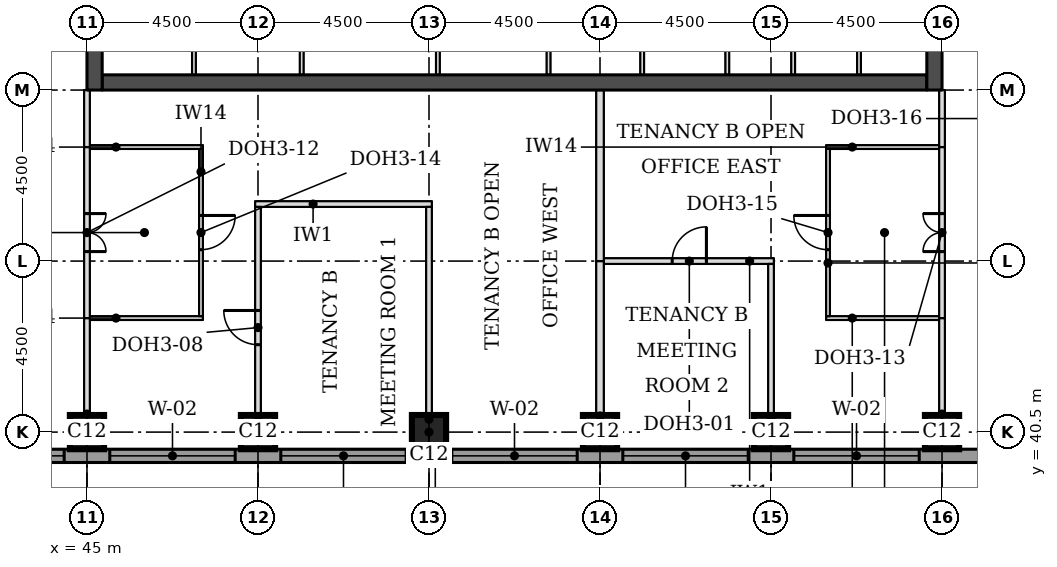
"""IFC4 building model, lengths in metres.
Left out: names, types, materials, properties, quantities, classifications, styles, units other than length and angle.
Written with IfcOpenShell. Run it as: python <this file> out.ifc"""

import sys

from ifc_helpers import new_model, si_unit, direction, frame, frame_2d, origin, origin_2d, place, context, subcontext, project, spatial, rectangle, extrude, element, fill, save


model = new_model("IFC4")
c1 = context("Model", 3, precision=1e-05, world=origin(), true_north=direction((0.0, 1.0)))
c2 = subcontext(c1, "Body", "Model", "MODEL_VIEW")
j1 = project(units=[si_unit("LENGTHUNIT", "METRE"), si_unit("PLANEANGLEUNIT", "RADIAN")], contexts=[c1])
p1 = place(None, origin())
s1 = spatial("IfcSite", under=j1, at=p1, CompositionType="ELEMENT")
p2 = place(p1, origin())
s2 = spatial("IfcBuilding", under=s1, at=p2, CompositionType="ELEMENT")
p3 = place(p2, frame((0.0, 0.0, 162.5)))
s3 = spatial("IfcBuildingStorey", under=s2, at=p3, CompositionType="ELEMENT", Elevation=162.5)
for number, where, z_axis, x_axis in (
    (1, (45.0, 40.5, 0.0), (0.0, 0.0, 1.0), (1.0, 0.0, 0.0)),
    (2, (49.5, 40.5, 0.0), (0.0, 0.0, 1.0), (1.0, 0.0, 0.0)),
    (3, (54.0, 40.5, 0.0), (0.0, 0.0, 1.0), (1.0, 0.0, 0.0)),
    (4, (58.5, 40.5, 0.0), (0.0, 0.0, 1.0), (1.0, 0.0, 0.0)),
    (5, (63.0, 40.5, 0.0), (0.0, 0.0, 1.0), (1.0, 0.0, 0.0)),
    (6, (67.5, 40.5, 0.0), (0.0, 0.0, 1.0), (1.0, 0.0, 0.0)),
):
    element("IfcColumn", number, at=place(p3, frame(where, z_axis=z_axis, x_axis=x_axis)), inside=s3, PredefinedType="COLUMN", context=c2, shape_type="SweptSolid", body=[
        extrude(rectangle(XDim=0.9, YDim=0.9, at=origin_2d()), origin(), (0.0, 0.0, 1.0), 3.7),
    ])
p4 = place(p3, frame((45.4, 49.7, 0.0), z_axis=(0.0, 0.0, 1.0), x_axis=(1.0, 0.0, 0.0)))
e7 = element("IfcWall", 7, at=p4, inside=s3, PredefinedType="SHEAR", context=c2, shape_type="SweptSolid", body=[
    extrude(rectangle(XDim=21.7, YDim=0.4, at=frame_2d((10.85, 0.0))), origin(), (0.0, 0.0, 1.0), 3.7),
])
p5 = place(p3, frame((45.2, 49.5, 0.0), z_axis=(0.0, 0.0, 1.0), x_axis=(0.0, 1.0, 0.0)))
e8 = element("IfcWall", 8, at=p5, inside=s3, PredefinedType="SHEAR", context=c2, shape_type="SweptSolid", body=[
    extrude(rectangle(XDim=22.5, YDim=0.4, at=frame_2d((11.25, 0.0))), origin(), (0.0, 0.0, 1.0), 3.7),
])
p6 = place(p5, frame((4.2, 0.0, 0.0)))
e9 = element("IfcOpeningElement", 9, at=p6, cuts=e8, PredefinedType="OPENING", context=c2, shape_type="SweptSolid", body=[
    extrude(rectangle(XDim=1.8, YDim=2.1, at=frame_2d((0.9, 1.05))), frame((0.0, 0.21, 0.0), z_axis=(0.0, -1.0, 0.0), x_axis=(1.0, 0.0, 0.0)), (0.0, 0.0, 1.0), 0.42),
])
p7 = place(p5, frame((6.9, 0.0, 0.0)))
e10 = element("IfcOpeningElement", 10, at=p7, cuts=e8, PredefinedType="OPENING", context=c2, shape_type="SweptSolid", body=[
    extrude(rectangle(XDim=1.1, YDim=2.1, at=frame_2d((0.55, 1.05))), frame((0.0, 0.21, 0.0), z_axis=(0.0, -1.0, 0.0), x_axis=(1.0, 0.0, 0.0)), (0.0, 0.0, 1.0), 0.42),
])
p8 = place(p5, frame((13.6, 0.0, 0.0)))
e11 = element("IfcOpeningElement", 11, at=p8, cuts=e8, PredefinedType="OPENING", context=c2, shape_type="SweptSolid", body=[
    extrude(rectangle(XDim=1.1, YDim=2.1, at=frame_2d((0.55, 1.05))), frame((0.0, 0.21, 0.0), z_axis=(0.0, -1.0, 0.0), x_axis=(1.0, 0.0, 0.0)), (0.0, 0.0, 1.0), 0.42),
])
p9 = place(p5, frame((16.5, 0.0, 0.0)))
e12 = element("IfcOpeningElement", 12, at=p9, cuts=e8, PredefinedType="OPENING", context=c2, shape_type="SweptSolid", body=[
    extrude(rectangle(XDim=1.8, YDim=2.1, at=frame_2d((0.9, 1.05))), frame((0.0, 0.21, 0.0), z_axis=(0.0, -1.0, 0.0), x_axis=(1.0, 0.0, 0.0)), (0.0, 0.0, 1.0), 0.42),
])
p10 = place(p3, frame((67.3, 49.5, 0.0), z_axis=(0.0, 0.0, 1.0), x_axis=(0.0, 1.0, 0.0)))
e13 = element("IfcWall", 13, at=p10, inside=s3, PredefinedType="SHEAR", context=c2, shape_type="SweptSolid", body=[
    extrude(rectangle(XDim=22.5, YDim=0.4, at=frame_2d((11.25, 0.0))), origin(), (0.0, 0.0, 1.0), 3.7),
])
p11 = place(p10, frame((4.2, 0.0, 0.0)))
e14 = element("IfcOpeningElement", 14, at=p11, cuts=e13, PredefinedType="OPENING", context=c2, shape_type="SweptSolid", body=[
    extrude(rectangle(XDim=1.8, YDim=2.1, at=frame_2d((0.9, 1.05))), frame((0.0, 0.21, 0.0), z_axis=(0.0, -1.0, 0.0), x_axis=(1.0, 0.0, 0.0)), (0.0, 0.0, 1.0), 0.42),
])
p12 = place(p10, frame((6.9, 0.0, 0.0)))
e15 = element("IfcOpeningElement", 15, at=p12, cuts=e13, PredefinedType="OPENING", context=c2, shape_type="SweptSolid", body=[
    extrude(rectangle(XDim=1.1, YDim=2.1, at=frame_2d((0.55, 1.05))), frame((0.0, 0.21, 0.0), z_axis=(0.0, -1.0, 0.0), x_axis=(1.0, 0.0, 0.0)), (0.0, 0.0, 1.0), 0.42),
])
p13 = place(p10, frame((13.6, 0.0, 0.0)))
e16 = element("IfcOpeningElement", 16, at=p13, cuts=e13, PredefinedType="OPENING", context=c2, shape_type="SweptSolid", body=[
    extrude(rectangle(XDim=1.1, YDim=2.1, at=frame_2d((0.55, 1.05))), frame((0.0, 0.21, 0.0), z_axis=(0.0, -1.0, 0.0), x_axis=(1.0, 0.0, 0.0)), (0.0, 0.0, 1.0), 0.42),
])
p14 = place(p10, frame((16.5, 0.0, 0.0)))
e17 = element("IfcOpeningElement", 17, at=p14, cuts=e13, PredefinedType="OPENING", context=c2, shape_type="SweptSolid", body=[
    extrude(rectangle(XDim=1.8, YDim=2.1, at=frame_2d((0.9, 1.05))), frame((0.0, 0.21, 0.0), z_axis=(0.0, -1.0, 0.0), x_axis=(1.0, 0.0, 0.0)), (0.0, 0.0, 1.0), 0.42),
])
p15 = place(p3, frame((36.0, 39.875, 0.0), z_axis=(0.0, 0.0, 1.0), x_axis=(1.0, 0.0, 0.0)))
e18 = element("IfcWall", 18, at=p15, inside=s3, PredefinedType="STANDARD", context=c2, shape_type="SweptSolid", body=[
    extrude(rectangle(XDim=36.331, YDim=0.35, at=frame_2d((18.166, 0.0))), origin(), (0.0, 0.0, 1.0), 3.525),
])
p16 = place(p15, frame((5.1, 0.0, 0.9)))
e19 = element("IfcOpeningElement", 19, at=p16, cuts=e18, PredefinedType="OPENING", context=c2, shape_type="SweptSolid", body=[
    extrude(rectangle(XDim=3.3, YDim=1.9, at=frame_2d((1.65, 0.95))), frame((0.0, 0.185, 0.0), z_axis=(0.0, -1.0, 0.0), x_axis=(1.0, 0.0, 0.0)), (0.0, 0.0, 1.0), 0.37),
])
p17 = place(p15, frame((9.6, 0.0, 0.9)))
e20 = element("IfcOpeningElement", 20, at=p17, cuts=e18, PredefinedType="OPENING", context=c2, shape_type="SweptSolid", body=[
    extrude(rectangle(XDim=3.3, YDim=1.9, at=frame_2d((1.65, 0.95))), frame((0.0, 0.185, 0.0), z_axis=(0.0, -1.0, 0.0), x_axis=(1.0, 0.0, 0.0)), (0.0, 0.0, 1.0), 0.37),
])
p18 = place(p15, frame((14.1, 0.0, 0.9)))
e21 = element("IfcOpeningElement", 21, at=p18, cuts=e18, PredefinedType="OPENING", context=c2, shape_type="SweptSolid", body=[
    extrude(rectangle(XDim=3.3, YDim=1.9, at=frame_2d((1.65, 0.95))), frame((0.0, 0.185, 0.0), z_axis=(0.0, -1.0, 0.0), x_axis=(1.0, 0.0, 0.0)), (0.0, 0.0, 1.0), 0.37),
])
p19 = place(p15, frame((18.6, 0.0, 0.9)))
e22 = element("IfcOpeningElement", 22, at=p19, cuts=e18, PredefinedType="OPENING", context=c2, shape_type="SweptSolid", body=[
    extrude(rectangle(XDim=3.3, YDim=1.9, at=frame_2d((1.65, 0.95))), frame((0.0, 0.185, 0.0), z_axis=(0.0, -1.0, 0.0), x_axis=(1.0, 0.0, 0.0)), (0.0, 0.0, 1.0), 0.37),
])
p20 = place(p15, frame((23.1, 0.0, 0.9)))
e23 = element("IfcOpeningElement", 23, at=p20, cuts=e18, PredefinedType="OPENING", context=c2, shape_type="SweptSolid", body=[
    extrude(rectangle(XDim=3.3, YDim=1.9, at=frame_2d((1.65, 0.95))), frame((0.0, 0.185, 0.0), z_axis=(0.0, -1.0, 0.0), x_axis=(1.0, 0.0, 0.0)), (0.0, 0.0, 1.0), 0.37),
])
p21 = place(p15, frame((27.6, 0.0, 0.9)))
e24 = element("IfcOpeningElement", 24, at=p21, cuts=e18, PredefinedType="OPENING", context=c2, shape_type="SweptSolid", body=[
    extrude(rectangle(XDim=3.3, YDim=1.9, at=frame_2d((1.65, 0.95))), frame((0.0, 0.185, 0.0), z_axis=(0.0, -1.0, 0.0), x_axis=(1.0, 0.0, 0.0)), (0.0, 0.0, 1.0), 0.37),
])
for number, where, z_axis, x_axis in (
    (25, (45.075, 43.5, 0.0), (0.0, 0.0, 1.0), (1.0, 0.0, 0.0)),
    (26, (64.45, 43.5, 0.0), (0.0, 0.0, 1.0), (1.0, 0.0, 0.0)),
):
    element("IfcWall", number, at=place(p3, frame(where, z_axis=z_axis, x_axis=x_axis)), inside=s3, PredefinedType="PARTITIONING", context=c2, shape_type="SweptSolid", body=[
        extrude(rectangle(XDim=2.975, YDim=0.1, at=frame_2d((1.488, 0.0))), origin(), (0.0, 0.0, 1.0), 3.55),
    ])
p22 = place(p3, frame((58.6, 45.0, 0.0), z_axis=(0.0, 0.0, 1.0), x_axis=(1.0, 0.0, 0.0)))
e27 = element("IfcWall", 27, at=p22, inside=s3, PredefinedType="PARTITIONING", context=c2, shape_type="SweptSolid", body=[
    extrude(rectangle(XDim=4.475, YDim=0.15, at=frame_2d((2.237, 0.0))), origin(), (0.0, 0.0, 1.0), 3.55),
])
p23 = place(p22, frame((1.8, 0.0, 0.0)))
e28 = element("IfcOpeningElement", 28, at=p23, cuts=e27, PredefinedType="OPENING", context=c2, shape_type="SweptSolid", body=[
    extrude(rectangle(XDim=0.9, YDim=2.1, at=frame_2d((0.45, 1.05))), frame((0.0, 0.085, 0.0), z_axis=(0.0, -1.0, 0.0), x_axis=(1.0, 0.0, 0.0)), (0.0, 0.0, 1.0), 0.17),
])
p24 = place(p3, frame((49.425, 46.5, 0.0), z_axis=(0.0, 0.0, 1.0), x_axis=(1.0, 0.0, 0.0)))
e29 = element("IfcWall", 29, at=p24, inside=s3, PredefinedType="PARTITIONING", context=c2, shape_type="SweptSolid", body=[
    extrude(rectangle(XDim=4.65, YDim=0.15, at=frame_2d((2.325, 0.0))), origin(), (0.0, 0.0, 1.0), 3.55),
])
for number, where, z_axis, x_axis in (
    (30, (45.075, 48.0, 0.0), (0.0, 0.0, 1.0), (1.0, 0.0, 0.0)),
    (31, (64.45, 48.0, 0.0), (0.0, 0.0, 1.0), (1.0, 0.0, 0.0)),
):
    element("IfcWall", number, at=place(p3, frame(where, z_axis=z_axis, x_axis=x_axis)), inside=s3, PredefinedType="PARTITIONING", context=c2, shape_type="SweptSolid", body=[
        extrude(rectangle(XDim=2.975, YDim=0.1, at=frame_2d((1.488, 0.0))), origin(), (0.0, 0.0, 1.0), 3.55),
    ])
p25 = place(p3, frame((45.0, 40.05, 0.0), z_axis=(0.0, 0.0, 1.0), x_axis=(0.0, 1.0, 0.0)))
e32 = element("IfcWall", 32, at=p25, inside=s3, PredefinedType="PARTITIONING", context=c2, shape_type="SweptSolid", body=[
    extrude(rectangle(XDim=3.45, YDim=0.15, at=frame_2d((1.725, 0.0))), origin(), (0.0, 0.0, 1.0), 3.022),
])
p26 = place(p3, frame((49.5, 40.05, 0.0), z_axis=(0.0, 0.0, 1.0), x_axis=(0.0, 1.0, 0.0)))
e33 = element("IfcWall", 33, at=p26, inside=s3, PredefinedType="PARTITIONING", context=c2, shape_type="SweptSolid", body=[
    extrude(rectangle(XDim=6.375, YDim=0.15, at=frame_2d((3.188, 0.0))), origin(), (0.0, 0.0, 1.0), 3.55),
])
p27 = place(p26, frame((2.75, 0.0, 0.0)))
e34 = element("IfcOpeningElement", 34, at=p27, cuts=e33, PredefinedType="OPENING", context=c2, shape_type="SweptSolid", body=[
    extrude(rectangle(XDim=0.9, YDim=2.1, at=frame_2d((0.45, 1.05))), frame((0.0, 0.085, 0.0), z_axis=(0.0, -1.0, 0.0), x_axis=(1.0, 0.0, 0.0)), (0.0, 0.0, 1.0), 0.17),
])
p28 = place(p3, frame((54.0, 40.05, 0.0), z_axis=(0.0, 0.0, 1.0), x_axis=(0.0, 1.0, 0.0)))
e35 = element("IfcWall", 35, at=p28, inside=s3, PredefinedType="PARTITIONING", context=c2, shape_type="SweptSolid", body=[
    extrude(rectangle(XDim=6.375, YDim=0.15, at=frame_2d((3.188, 0.0))), origin(), (0.0, 0.0, 1.0), 3.55),
])
p29 = place(p3, frame((58.5, 40.05, 0.0), z_axis=(0.0, 0.0, 1.0), x_axis=(0.0, 1.0, 0.0)))
e36 = element("IfcWall", 36, at=p29, inside=s3, PredefinedType="PARTITIONING", context=c2, shape_type="SweptSolid", body=[
    extrude(rectangle(XDim=4.95, YDim=0.2, at=frame_2d((2.475, 0.0))), origin(), (0.0, 0.0, 1.0), 3.55),
])
p30 = place(p3, frame((63.0, 40.05, 0.0), z_axis=(0.0, 0.0, 1.0), x_axis=(0.0, 1.0, 0.0)))
e37 = element("IfcWall", 37, at=p30, inside=s3, PredefinedType="PARTITIONING", context=c2, shape_type="SweptSolid", body=[
    extrude(rectangle(XDim=4.875, YDim=0.15, at=frame_2d((2.438, 0.0))), origin(), (0.0, 0.0, 1.0), 3.55),
])
p31 = place(p3, frame((67.5, 40.05, 0.0), z_axis=(0.0, 0.0, 1.0), x_axis=(0.0, 1.0, 0.0)))
e38 = element("IfcWall", 38, at=p31, inside=s3, PredefinedType="PARTITIONING", context=c2, shape_type="SweptSolid", body=[
    extrude(rectangle(XDim=3.45, YDim=0.15, at=frame_2d((1.725, 0.0))), origin(), (0.0, 0.0, 1.0), 3.022),
])
p32 = place(p3, frame((45.0, 43.5, 0.0), z_axis=(0.0, 0.0, 1.0), x_axis=(0.0, 1.0, 0.0)))
e39 = element("IfcWall", 39, at=p32, inside=s3, PredefinedType="PARTITIONING", context=c2, shape_type="SweptSolid", body=[
    extrude(rectangle(XDim=4.5, YDim=0.15, at=frame_2d((2.25, 0.0))), origin(), (0.0, 0.0, 1.0), 3.022),
])
p33 = place(p32, frame((1.75, 0.0, 0.0)))
e40 = element("IfcOpeningElement", 40, at=p33, cuts=e39, PredefinedType="OPENING", context=c2, shape_type="SweptSolid", body=[
    extrude(rectangle(XDim=1.0, YDim=2.1, at=frame_2d((0.5, 1.05))), frame((0.0, 0.085, 0.0), z_axis=(0.0, -1.0, 0.0), x_axis=(1.0, 0.0, 0.0)), (0.0, 0.0, 1.0), 0.17),
])
p34 = place(p3, frame((67.5, 43.5, 0.0), z_axis=(0.0, 0.0, 1.0), x_axis=(0.0, 1.0, 0.0)))
e41 = element("IfcWall", 41, at=p34, inside=s3, PredefinedType="PARTITIONING", context=c2, shape_type="SweptSolid", body=[
    extrude(rectangle(XDim=4.5, YDim=0.15, at=frame_2d((2.25, 0.0))), origin(), (0.0, 0.0, 1.0), 3.022),
])
p35 = place(p34, frame((1.75, 0.0, 0.0)))
e42 = element("IfcOpeningElement", 42, at=p35, cuts=e41, PredefinedType="OPENING", context=c2, shape_type="SweptSolid", body=[
    extrude(rectangle(XDim=1.0, YDim=2.1, at=frame_2d((0.5, 1.05))), frame((0.0, 0.085, 0.0), z_axis=(0.0, -1.0, 0.0), x_axis=(1.0, 0.0, 0.0)), (0.0, 0.0, 1.0), 0.17),
])
p36 = place(p3, frame((48.0, 43.55, 0.0), z_axis=(0.0, 0.0, 1.0), x_axis=(0.0, 1.0, 0.0)))
e43 = element("IfcWall", 43, at=p36, inside=s3, PredefinedType="PARTITIONING", context=c2, shape_type="SweptSolid", body=[
    extrude(rectangle(XDim=4.4, YDim=0.1, at=frame_2d((2.2, 0.0))), origin(), (0.0, 0.0, 1.0), 3.55),
])
p37 = place(p36, frame((1.75, 0.0, 0.0)))
e44 = element("IfcOpeningElement", 44, at=p37, cuts=e43, PredefinedType="OPENING", context=c2, shape_type="SweptSolid", body=[
    extrude(rectangle(XDim=0.9, YDim=2.1, at=frame_2d((0.45, 1.05))), frame((0.0, 0.06, 0.0), z_axis=(0.0, -1.0, 0.0), x_axis=(1.0, 0.0, 0.0)), (0.0, 0.0, 1.0), 0.12),
])
p38 = place(p3, frame((64.5, 43.55, 0.0), z_axis=(0.0, 0.0, 1.0), x_axis=(0.0, 1.0, 0.0)))
e45 = element("IfcWall", 45, at=p38, inside=s3, PredefinedType="PARTITIONING", context=c2, shape_type="SweptSolid", body=[
    extrude(rectangle(XDim=4.4, YDim=0.1, at=frame_2d((2.2, 0.0))), origin(), (0.0, 0.0, 1.0), 3.55),
])
p39 = place(p38, frame((1.75, 0.0, 0.0)))
e46 = element("IfcOpeningElement", 46, at=p39, cuts=e45, PredefinedType="OPENING", context=c2, shape_type="SweptSolid", body=[
    extrude(rectangle(XDim=0.9, YDim=2.1, at=frame_2d((0.45, 1.05))), frame((0.0, 0.06, 0.0), z_axis=(0.0, -1.0, 0.0), x_axis=(1.0, 0.0, 0.0)), (0.0, 0.0, 1.0), 0.12),
])
p40 = place(p3, frame((58.5, 45.0, 0.0), z_axis=(0.0, 0.0, 1.0), x_axis=(0.0, 1.0, 0.0)))
e47 = element("IfcWall", 47, at=p40, inside=s3, PredefinedType="PARTITIONING", context=c2, shape_type="SweptSolid", body=[
    extrude(rectangle(XDim=4.5, YDim=0.2, at=frame_2d((2.25, 0.0))), origin(), (0.0, 0.0, 1.0), 3.55),
])
for number, where, z_axis, x_axis in (
    (48, (45.0, 48.0, 0.0), (0.0, 0.0, 1.0), (0.0, 1.0, 0.0)),
    (49, (67.5, 48.0, 0.0), (0.0, 0.0, 1.0), (0.0, 1.0, 0.0)),
):
    element("IfcWall", number, at=place(p3, frame(where, z_axis=z_axis, x_axis=x_axis)), inside=s3, PredefinedType="PARTITIONING", context=c2, shape_type="SweptSolid", body=[
        extrude(rectangle(XDim=1.5, YDim=0.15, at=frame_2d((0.75, 0.0))), origin(), (0.0, 0.0, 1.0), 3.022),
    ])
for number, where, z_axis, x_axis in (
    (50, (47.815, 49.9, 0.0), (0.0, 0.0, 1.0), (0.0, 1.0, 0.0)),
    (51, (50.65, 49.9, 0.0), (0.0, 0.0, 1.0), (0.0, 1.0, 0.0)),
    (52, (54.234, 49.9, 0.0), (0.0, 0.0, 1.0), (0.0, 1.0, 0.0)),
    (53, (57.146, 49.9, 0.0), (0.0, 0.0, 1.0), (0.0, 1.0, 0.0)),
    (54, (59.61, 49.9, 0.0), (0.0, 0.0, 1.0), (0.0, 1.0, 0.0)),
    (55, (61.85, 49.9, 0.0), (0.0, 0.0, 1.0), (0.0, 1.0, 0.0)),
    (56, (63.583, 49.9, 0.0), (0.0, 0.0, 1.0), (0.0, 1.0, 0.0)),
    (57, (65.315, 49.9, 0.0), (0.0, 0.0, 1.0), (0.0, 1.0, 0.0)),
):
    element("IfcWall", number, at=place(p3, frame(where, z_axis=z_axis, x_axis=x_axis)), inside=s3, PredefinedType="PARTITIONING", context=c2, shape_type="SweptSolid", body=[
        extrude(rectangle(XDim=3.1, YDim=0.1, at=frame_2d((1.55, 0.0))), origin(), (0.0, 0.0, 1.0), 3.55),
    ])
p41 = place(p16, origin())
e58 = element("IfcWindow", 58, at=p41, inside=s3, PartitioningType="SINGLE_PANEL", PredefinedType="WINDOW", context=c2, shape_type="SweptSolid", body=[
    extrude(rectangle(XDim=3.3, YDim=1.9, at=frame_2d((1.65, 0.95))), frame((0.0, 0.085, 0.0), z_axis=(0.0, -1.0, 0.0), x_axis=(1.0, 0.0, 0.0)), (0.0, 0.0, 1.0), 0.06),
])
fill(e19, e58)
p42 = place(p17, origin())
e59 = element("IfcWindow", 59, at=p42, inside=s3, PartitioningType="SINGLE_PANEL", PredefinedType="WINDOW", context=c2, shape_type="SweptSolid", body=[
    extrude(rectangle(XDim=3.3, YDim=1.9, at=frame_2d((1.65, 0.95))), frame((0.0, 0.085, 0.0), z_axis=(0.0, -1.0, 0.0), x_axis=(1.0, 0.0, 0.0)), (0.0, 0.0, 1.0), 0.06),
])
fill(e20, e59)
p43 = place(p18, origin())
e60 = element("IfcWindow", 60, at=p43, inside=s3, PartitioningType="SINGLE_PANEL", PredefinedType="WINDOW", context=c2, shape_type="SweptSolid", body=[
    extrude(rectangle(XDim=3.3, YDim=1.9, at=frame_2d((1.65, 0.95))), frame((0.0, 0.085, 0.0), z_axis=(0.0, -1.0, 0.0), x_axis=(1.0, 0.0, 0.0)), (0.0, 0.0, 1.0), 0.06),
])
fill(e21, e60)
p44 = place(p19, origin())
e61 = element("IfcWindow", 61, at=p44, inside=s3, PartitioningType="SINGLE_PANEL", PredefinedType="WINDOW", context=c2, shape_type="SweptSolid", body=[
    extrude(rectangle(XDim=3.3, YDim=1.9, at=frame_2d((1.65, 0.95))), frame((0.0, 0.085, 0.0), z_axis=(0.0, -1.0, 0.0), x_axis=(1.0, 0.0, 0.0)), (0.0, 0.0, 1.0), 0.06),
])
fill(e22, e61)
p45 = place(p20, origin())
e62 = element("IfcWindow", 62, at=p45, inside=s3, PartitioningType="SINGLE_PANEL", PredefinedType="WINDOW", context=c2, shape_type="SweptSolid", body=[
    extrude(rectangle(XDim=3.3, YDim=1.9, at=frame_2d((1.65, 0.95))), frame((0.0, 0.085, 0.0), z_axis=(0.0, -1.0, 0.0), x_axis=(1.0, 0.0, 0.0)), (0.0, 0.0, 1.0), 0.06),
])
fill(e23, e62)
p46 = place(p21, origin())
e63 = element("IfcWindow", 63, at=p46, inside=s3, PartitioningType="SINGLE_PANEL", PredefinedType="WINDOW", context=c2, shape_type="SweptSolid", body=[
    extrude(rectangle(XDim=3.3, YDim=1.9, at=frame_2d((1.65, 0.95))), frame((0.0, 0.085, 0.0), z_axis=(0.0, -1.0, 0.0), x_axis=(1.0, 0.0, 0.0)), (0.0, 0.0, 1.0), 0.06),
])
fill(e24, e63)
p47 = place(p33, frame((1.0, 0.0, 0.0), z_axis=(0.0, 0.0, 1.0), x_axis=(-1.0, 0.0, 0.0)))
e64 = element("IfcDoor", 64, at=p47, inside=s3, OperationType="DOUBLE_DOOR_SINGLE_SWING", PredefinedType="DOOR", context=c2, shape_type="SweptSolid", body=[
    extrude(rectangle(XDim=1.0, YDim=2.1, at=frame_2d((0.5, 1.05))), frame((0.0, 0.025, 0.0), z_axis=(0.0, -1.0, 0.0), x_axis=(1.0, 0.0, 0.0)), (0.0, 0.0, 1.0), 0.05),
])
fill(e40, e64)
p48 = place(p37, frame((0.9, 0.0, 0.0), z_axis=(0.0, 0.0, 1.0), x_axis=(-1.0, 0.0, 0.0)))
e65 = element("IfcDoor", 65, at=p48, inside=s3, OperationType="SINGLE_SWING_LEFT", PredefinedType="DOOR", context=c2, shape_type="SweptSolid", body=[
    extrude(rectangle(XDim=0.9, YDim=2.1, at=frame_2d((0.45, 1.05))), frame((0.0, 0.025, 0.0), z_axis=(0.0, -1.0, 0.0), x_axis=(1.0, 0.0, 0.0)), (0.0, 0.0, 1.0), 0.05),
])
fill(e44, e65)
p49 = place(p27, origin())
e66 = element("IfcDoor", 66, at=p49, inside=s3, OperationType="SINGLE_SWING_RIGHT", PredefinedType="DOOR", context=c2, shape_type="SweptSolid", body=[
    extrude(rectangle(XDim=0.9, YDim=2.1, at=frame_2d((0.45, 1.05))), frame((0.0, 0.025, 0.0), z_axis=(0.0, -1.0, 0.0), x_axis=(1.0, 0.0, 0.0)), (0.0, 0.0, 1.0), 0.05),
])
fill(e34, e66)
p50 = place(p35, origin())
e67 = element("IfcDoor", 67, at=p50, inside=s3, OperationType="DOUBLE_DOOR_SINGLE_SWING", PredefinedType="DOOR", context=c2, shape_type="SweptSolid", body=[
    extrude(rectangle(XDim=1.0, YDim=2.1, at=frame_2d((0.5, 1.05))), frame((0.0, 0.025, 0.0), z_axis=(0.0, -1.0, 0.0), x_axis=(1.0, 0.0, 0.0)), (0.0, 0.0, 1.0), 0.05),
])
fill(e42, e67)
p51 = place(p39, origin())
e68 = element("IfcDoor", 68, at=p51, inside=s3, OperationType="SINGLE_SWING_RIGHT", PredefinedType="DOOR", context=c2, shape_type="SweptSolid", body=[
    extrude(rectangle(XDim=0.9, YDim=2.1, at=frame_2d((0.45, 1.05))), frame((0.0, 0.025, 0.0), z_axis=(0.0, -1.0, 0.0), x_axis=(1.0, 0.0, 0.0)), (0.0, 0.0, 1.0), 0.05),
])
fill(e46, e68)
p52 = place(p23, origin())
e69 = element("IfcDoor", 69, at=p52, inside=s3, OperationType="SINGLE_SWING_RIGHT", PredefinedType="DOOR", context=c2, shape_type="SweptSolid", body=[
    extrude(rectangle(XDim=0.9, YDim=2.1, at=frame_2d((0.45, 1.05))), frame((0.0, 0.025, 0.0), z_axis=(0.0, -1.0, 0.0), x_axis=(1.0, 0.0, 0.0)), (0.0, 0.0, 1.0), 0.05),
])
fill(e28, e69)
save(model, sys.argv[1])
